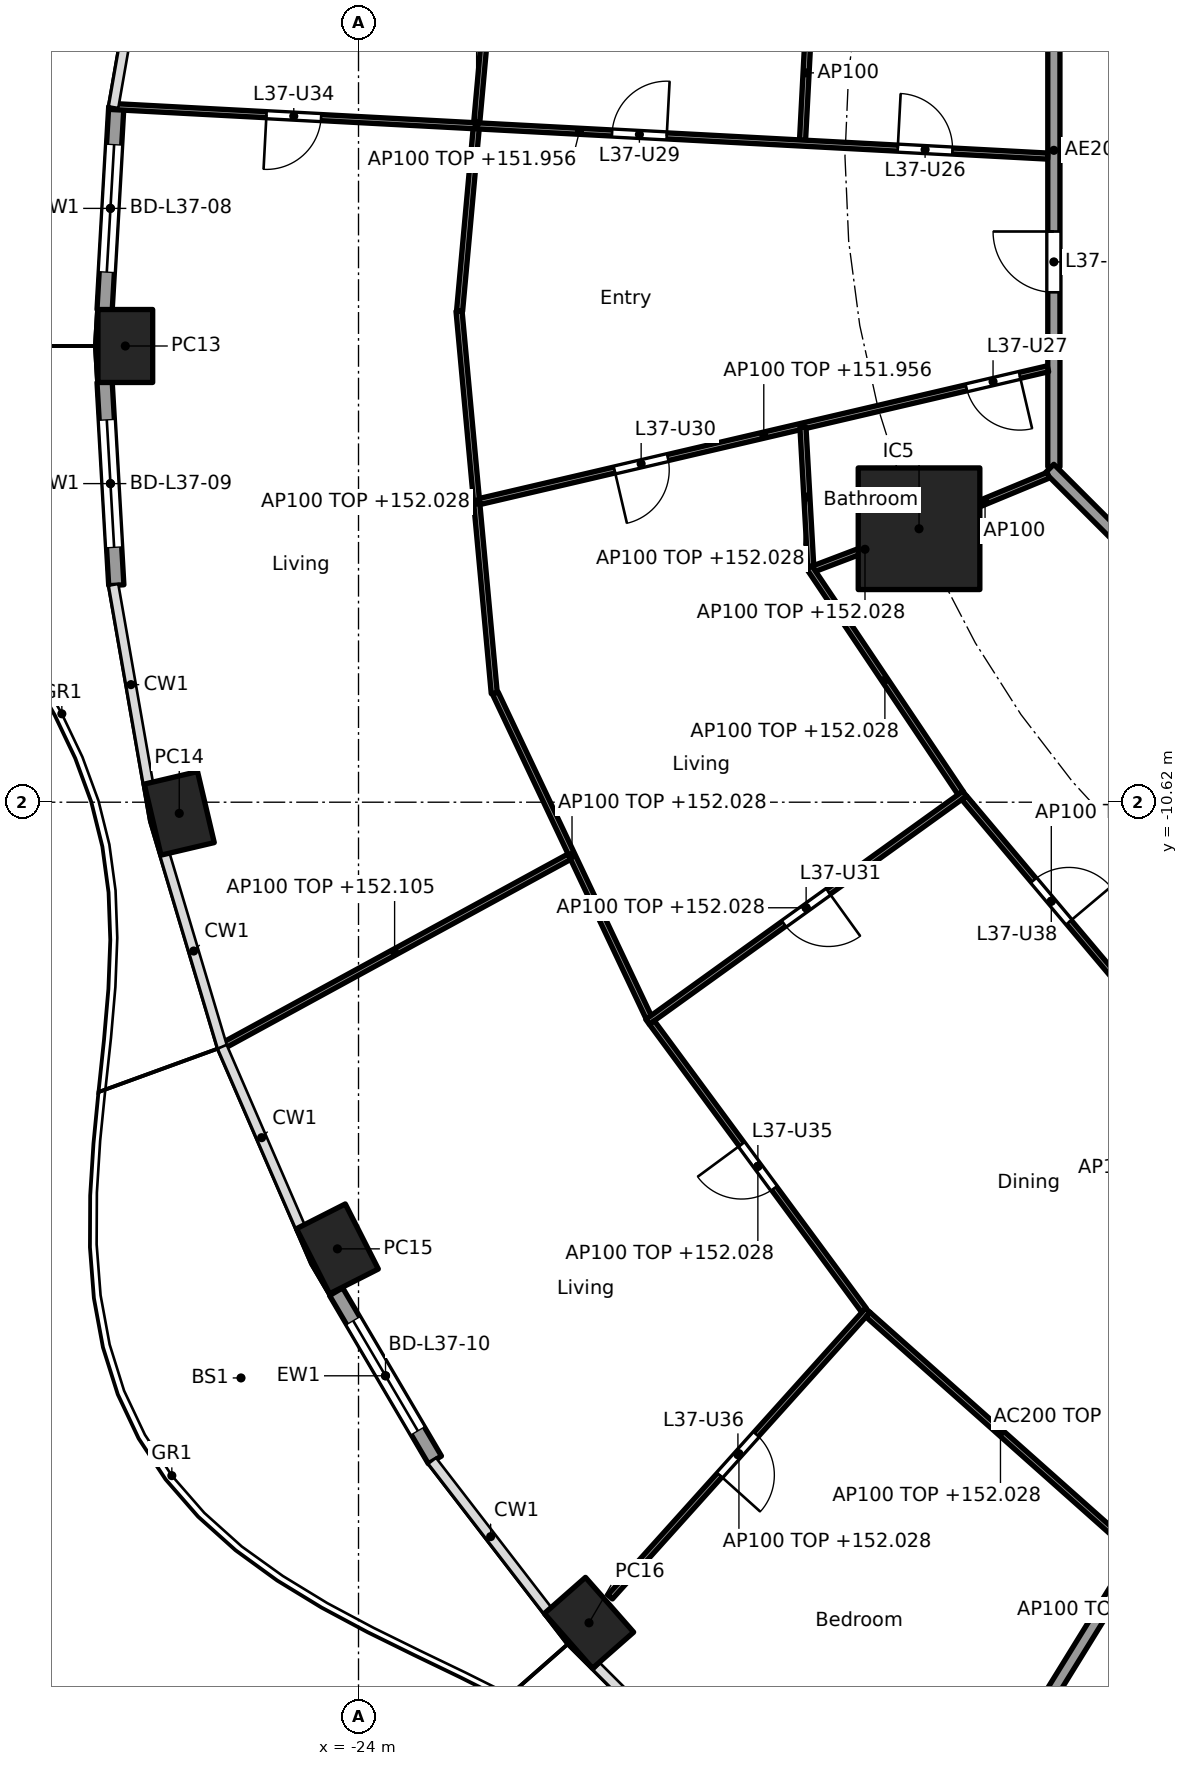
"""IFC4 building model, lengths in metres.
Left out: names, types, materials, properties, quantities, classifications, styles, units other than length and angle.
Written with IfcOpenShell. Run it as: python <this file> out.ifc"""

import sys

from ifc_helpers import new_model, si_unit, direction, frame, frame_2d, origin, origin_2d, place, context, subcontext, project, spatial, rectangle, hollow_rectangle, extrude, element, fill, save


model = new_model("IFC4")
c1 = context("Model", 3, precision=1e-05, world=origin(), true_north=direction((0.0, 1.0)))
c2 = subcontext(c1, "Body", "Model", "MODEL_VIEW")
j1 = project(units=[si_unit("LENGTHUNIT", "METRE"), si_unit("PLANEANGLEUNIT", "RADIAN")], contexts=[c1])
p1 = place(None, origin())
s1 = spatial("IfcSite", under=j1, at=p1, CompositionType="ELEMENT")
p2 = place(p1, origin())
s2 = spatial("IfcBuilding", under=s1, at=p2, CompositionType="ELEMENT")
p3 = place(p2, frame((0.0, 0.0, 149.2)))
s3 = spatial("IfcBuildingStorey", under=s2, at=p3, CompositionType="ELEMENT", Elevation=149.2)
for number, where, z_axis, x_axis in (
    (1, (-27.835, -3.118, 0.0), (0.0, 0.0, 1.0), (0.0, -1.0, 0.0)),
    (2, (-26.948, -10.803, 0.0), (0.0, 0.0, 1.0), (0.229, -0.973, 0.0)),
    (3, (-24.347, -17.965, 0.0), (0.0, 0.0, 1.0), (0.452, -0.892, 0.0)),
    (4, (-20.209, -24.115, 0.0), (0.0, 0.0, 1.0), (0.66, -0.751, 0.0)),
):
    element("IfcColumn", number, at=place(p3, frame(where, z_axis=z_axis, x_axis=x_axis)), inside=s3, PredefinedType="COLUMN", context=c2, shape_type="SweptSolid", body=[
        extrude(hollow_rectangle(XDim=1.2, YDim=0.9, WallThickness=0.04, at=origin_2d()), origin(), (0.0, 0.0, 1.0), 3.7),
    ])
p4 = place(p3, frame((-14.782, -6.123, 0.0), z_axis=(0.0, 0.0, 1.0), x_axis=(1.0, 0.0, 0.0)))
e5 = element("IfcColumn", 5, at=p4, inside=s3, PredefinedType="COLUMN", context=c2, shape_type="SweptSolid", body=[
    extrude(rectangle(XDim=2.0, YDim=2.0, at=origin_2d()), origin(), (0.0, 0.0, 1.0), 3.7),
])
p5 = place(p3, frame((-28.176, -2.526, 0.0), z_axis=(0.0, 0.0, 1.0), x_axis=(0.057537829427, 0.998343326809, 0.0)))
e6 = element("IfcWall", 6, at=p5, inside=s3, PredefinedType="SOLIDWALL", context=c2, shape_type="SweptSolid", body=[
    extrude(rectangle(XDim=3.348, YDim=0.25, at=frame_2d((1.674, 0.0))), origin(), (0.0, 0.0, 1.0), 3.44),
])
p6 = place(p5, frame((0.624, 0.0, 0.0)))
e7 = element("IfcOpeningElement", 7, at=p6, cuts=e6, PredefinedType="OPENING", context=c2, shape_type="SweptSolid", body=[
    extrude(rectangle(XDim=2.1, YDim=2.4, at=frame_2d((1.05, 1.2))), frame((0.0, 0.135, 0.0), z_axis=(0.0, -1.0, 0.0), x_axis=(1.0, 0.0, 0.0)), (0.0, 0.0, 1.0), 0.27),
])
p7 = place(p3, frame((-27.983, -7.052, 0.0), z_axis=(0.0, 0.0, 1.0), x_axis=(-0.057537829427, 0.998343326809, 0.0)))
e8 = element("IfcWall", 8, at=p7, inside=s3, PredefinedType="SOLIDWALL", context=c2, shape_type="SweptSolid", body=[
    extrude(rectangle(XDim=3.348, YDim=0.25, at=frame_2d((1.674, 0.0))), origin(), (0.0, 0.0, 1.0), 3.44),
])
p8 = place(p7, frame((0.624, 0.0, 0.0)))
e9 = element("IfcOpeningElement", 9, at=p8, cuts=e8, PredefinedType="OPENING", context=c2, shape_type="SweptSolid", body=[
    extrude(rectangle(XDim=2.1, YDim=2.4, at=frame_2d((1.05, 1.2))), frame((0.0, 0.135, 0.0), z_axis=(0.0, -1.0, 0.0), x_axis=(1.0, 0.0, 0.0)), (0.0, 0.0, 1.0), 0.27),
])
p9 = place(p3, frame((-22.744, -21.436, 0.0), z_axis=(0.0, 0.0, 1.0), x_axis=(-0.506314982873, 0.862348617508, 0.0)))
e10 = element("IfcWall", 10, at=p9, inside=s3, PredefinedType="SOLIDWALL", context=c2, shape_type="SweptSolid", body=[
    extrude(rectangle(XDim=3.208, YDim=0.25, at=frame_2d((1.604, 0.0))), origin(), (0.0, 0.0, 1.0), 3.44),
])
p10 = place(p9, frame((0.554, 0.0, 0.0)))
e11 = element("IfcOpeningElement", 11, at=p10, cuts=e10, PredefinedType="OPENING", context=c2, shape_type="SweptSolid", body=[
    extrude(rectangle(XDim=2.1, YDim=2.4, at=frame_2d((1.05, 1.2))), frame((0.0, 0.135, 0.0), z_axis=(0.0, -1.0, 0.0), x_axis=(1.0, 0.0, 0.0)), (0.0, 0.0, 1.0), 0.27),
])
p11 = place(p3, frame((-6.149, -14.825, 0.0), z_axis=(0.0, 0.0, 1.0), x_axis=(-0.525406383516, -0.85085141603, 0.0)))
e12 = element("IfcWall", 12, at=p11, inside=s3, PredefinedType="PARTITIONING", context=c2, shape_type="SweptSolid", body=[
    extrude(rectangle(XDim=15.925, YDim=0.2, at=frame_2d((7.962, 0.0))), origin(), (0.0, 0.0, 1.0), 2.828),
])
p12 = place(p3, frame((-12.565, 5.304, 0.0), z_axis=(0.0, 0.0, 1.0), x_axis=(0.0, -1.0, 0.0)))
e13 = element("IfcWall", 13, at=p12, inside=s3, PredefinedType="PARTITIONING", context=c2, shape_type="SweptSolid", body=[
    extrude(rectangle(XDim=10.409, YDim=0.2, at=frame_2d((5.205, 0.0))), origin(), (0.0, 0.0, 1.0), 3.44),
])
p13 = place(p12, frame((6.539, 0.0, 0.0)))
e14 = element("IfcOpeningElement", 14, at=p13, cuts=e13, PredefinedType="OPENING", context=c2, shape_type="SweptSolid", body=[
    extrude(rectangle(XDim=1.0, YDim=2.1, at=frame_2d((0.5, 1.05))), frame((0.0, 0.11, 0.0), z_axis=(0.0, -1.0, 0.0), x_axis=(1.0, 0.0, 0.0)), (0.0, 0.0, 1.0), 0.22),
])
p14 = place(p3, frame((-12.635, -5.134, 0.0), z_axis=(0.0, 0.0, 1.0), x_axis=(0.707106781187, -0.707106781187, 0.0)))
e15 = element("IfcWall", 15, at=p14, inside=s3, PredefinedType="PARTITIONING", context=c2, shape_type="SweptSolid", body=[
    extrude(rectangle(XDim=10.609, YDim=0.2, at=frame_2d((5.305, 0.0))), origin(), (0.0, 0.0, 1.0), 3.44),
])
p15 = place(p3, frame((-16.581, 2.485, 0.0), z_axis=(0.0, 0.0, 1.0), x_axis=(-0.052455156936, -0.998623280577, 0.0)))
e16 = element("IfcWall", 16, at=p15, inside=s3, PredefinedType="PARTITIONING", context=c2, shape_type="SweptSolid", body=[
    extrude(rectangle(XDim=2.225, YDim=0.1, at=frame_2d((1.112, 0.0))), origin(), (0.0, 0.0, 1.0), 3.44),
])
p16 = place(p3, frame((-21.777, 3.621, 0.0), z_axis=(0.0, 0.0, 1.0), x_axis=(-0.090606877484, -0.995886737412, 0.0)))
e17 = element("IfcWall", 17, at=p16, inside=s3, PredefinedType="PARTITIONING", context=c2, shape_type="SweptSolid", body=[
    extrude(rectangle(XDim=6.189, YDim=0.1, at=frame_2d((3.095, 0.0))), origin(), (0.0, 0.0, 1.0), 2.828),
])
p17 = place(p3, frame((-12.665, 0.005, 0.0), z_axis=(0.0, 0.0, 1.0), x_axis=(-0.998599229025, 0.052911055468, 0.0)))
e18 = element("IfcWall", 18, at=p17, inside=s3, PredefinedType="PARTITIONING", context=c2, shape_type="SweptSolid", body=[
    extrude(rectangle(XDim=15.425, YDim=0.1, at=frame_2d((7.713, 0.0))), origin(), (0.0, 0.0, 1.0), 2.756),
])
p18 = place(p17, frame((1.571, 0.0, 0.0)))
e19 = element("IfcOpeningElement", 19, at=p18, cuts=e18, PredefinedType="OPENING", context=c2, shape_type="SweptSolid", body=[
    extrude(rectangle(XDim=0.9, YDim=2.1, at=frame_2d((0.45, 1.05))), frame((0.0, 0.06, 0.0), z_axis=(0.0, -1.0, 0.0), x_axis=(1.0, 0.0, 0.0)), (0.0, 0.0, 1.0), 0.12),
])
p19 = place(p17, frame((6.276, 0.0, 0.0)))
e20 = element("IfcOpeningElement", 20, at=p19, cuts=e18, PredefinedType="OPENING", context=c2, shape_type="SweptSolid", body=[
    extrude(rectangle(XDim=0.9, YDim=2.1, at=frame_2d((0.45, 1.05))), frame((0.0, 0.06, 0.0), z_axis=(0.0, -1.0, 0.0), x_axis=(1.0, 0.0, 0.0)), (0.0, 0.0, 1.0), 0.12),
])
p20 = place(p17, frame((11.967, 0.0, 0.0)))
e21 = element("IfcOpeningElement", 21, at=p20, cuts=e18, PredefinedType="OPENING", context=c2, shape_type="SweptSolid", body=[
    extrude(rectangle(XDim=0.9, YDim=2.1, at=frame_2d((0.45, 1.05))), frame((0.0, 0.06, 0.0), z_axis=(0.0, -1.0, 0.0), x_axis=(1.0, 0.0, 0.0)), (0.0, 0.0, 1.0), 0.12),
])
p21 = place(p3, frame((-22.347, -2.542, 0.0), z_axis=(0.0, 0.0, 1.0), x_axis=(0.091783634244, -0.995778973711, 0.0)))
e22 = element("IfcWall", 22, at=p21, inside=s3, PredefinedType="PARTITIONING", context=c2, shape_type="SweptSolid", body=[
    extrude(rectangle(XDim=6.315, YDim=0.1, at=frame_2d((3.157, 0.0))), origin(), (0.0, 0.0, 1.0), 2.828),
])
p22 = place(p3, frame((-12.662, -3.492, 0.0), z_axis=(0.0, 0.0, 1.0), x_axis=(-0.973798787998, -0.227411346448, 0.0)))
e23 = element("IfcWall", 23, at=p22, inside=s3, PredefinedType="PARTITIONING", context=c2, shape_type="SweptSolid", body=[
    extrude(rectangle(XDim=9.598, YDim=0.1, at=frame_2d((4.799, 0.0))), origin(), (0.0, 0.0, 1.0), 2.756),
])
p23 = place(p22, frame((0.477, 0.0, 0.0)))
e24 = element("IfcOpeningElement", 24, at=p23, cuts=e23, PredefinedType="OPENING", context=c2, shape_type="SweptSolid", body=[
    extrude(rectangle(XDim=0.9, YDim=2.1, at=frame_2d((0.45, 1.05))), frame((0.0, 0.06, 0.0), z_axis=(0.0, -1.0, 0.0), x_axis=(1.0, 0.0, 0.0)), (0.0, 0.0, 1.0), 0.12),
])
p24 = place(p22, frame((6.42, 0.0, 0.0)))
e25 = element("IfcOpeningElement", 25, at=p24, cuts=e23, PredefinedType="OPENING", context=c2, shape_type="SweptSolid", body=[
    extrude(rectangle(XDim=0.9, YDim=2.1, at=frame_2d((0.45, 1.05))), frame((0.0, 0.06, 0.0), z_axis=(0.0, -1.0, 0.0), x_axis=(1.0, 0.0, 0.0)), (0.0, 0.0, 1.0), 0.12),
])
p25 = place(p3, frame((-16.691, -4.454, 0.0), z_axis=(0.0, 0.0, 1.0), x_axis=(0.05596405841, -0.998432784, 0.0)))
e26 = element("IfcWall", 26, at=p25, inside=s3, PredefinedType="PARTITIONING", context=c2, shape_type="SweptSolid", body=[
    extrude(rectangle(XDim=2.299, YDim=0.1, at=frame_2d((1.149, 0.0))), origin(), (0.0, 0.0, 1.0), 2.828),
])
p26 = place(p3, frame((-12.657, -5.243, 0.0), z_axis=(0.0, 0.0, 1.0), x_axis=(-0.923864733477, -0.382719158442, 0.0)))
e27 = element("IfcWall", 27, at=p26, inside=s3, PredefinedType="PARTITIONING", context=c2, shape_type="SweptSolid", body=[
    extrude(rectangle(XDim=2.25, YDim=0.1, at=frame_2d((1.125, 0.0))), origin(), (0.0, 0.0, 1.0), 3.44),
])
p27 = place(p3, frame((-14.829, -6.141, 0.0), z_axis=(0.0, 0.0, 1.0), x_axis=(-0.934704367514, -0.355426146128, 0.0)))
e28 = element("IfcWall", 28, at=p27, inside=s3, PredefinedType="PARTITIONING", context=c2, shape_type="SweptSolid", body=[
    extrude(rectangle(XDim=1.802, YDim=0.1, at=frame_2d((0.901, 0.0))), origin(), (0.0, 0.0, 1.0), 2.828),
])
p28 = place(p3, frame((-16.587, -6.757, 0.0), z_axis=(0.0, 0.0, 1.0), x_axis=(0.55699383956, -0.830516623971, 0.0)))
e29 = element("IfcWall", 29, at=p28, inside=s3, PredefinedType="PARTITIONING", context=c2, shape_type="SweptSolid", body=[
    extrude(rectangle(XDim=4.467, YDim=0.1, at=frame_2d((2.233, 0.0))), origin(), (0.0, 0.0, 1.0), 2.828),
])
p29 = place(p3, frame((-21.75, -8.826, 0.0), z_axis=(0.0, 0.0, 1.0), x_axis=(0.427739388908, -0.903902104863, 0.0)))
e30 = element("IfcWall", 30, at=p29, inside=s3, PredefinedType="PARTITIONING", context=c2, shape_type="SweptSolid", body=[
    extrude(rectangle(XDim=5.899, YDim=0.1, at=frame_2d((2.949, 0.0))), origin(), (0.0, 0.0, 1.0), 2.828),
])
p30 = place(p3, frame((-20.533, -11.516, 0.0), z_axis=(0.0, 0.0, 1.0), x_axis=(-0.877731656478, -0.479152521872, 0.0)))
e31 = element("IfcWall", 31, at=p30, inside=s3, PredefinedType="PARTITIONING", context=c2, shape_type="SweptSolid", body=[
    extrude(rectangle(XDim=6.548, YDim=0.1, at=frame_2d((3.274, 0.0))), origin(), (0.0, 0.0, 1.0), 2.905),
])
p31 = place(p3, frame((-14.031, -10.479, 0.0), z_axis=(0.0, 0.0, 1.0), x_axis=(-0.811653955345, -0.584138559567, 0.0)))
e32 = element("IfcWall", 32, at=p31, inside=s3, PredefinedType="PARTITIONING", context=c2, shape_type="SweptSolid", body=[
    extrude(rectangle(XDim=6.426, YDim=0.1, at=frame_2d((3.213, 0.0))), origin(), (0.0, 0.0, 1.0), 2.828),
])
p32 = place(p31, frame((2.763, 0.0, 0.0)))
e33 = element("IfcOpeningElement", 33, at=p32, cuts=e32, PredefinedType="OPENING", context=c2, shape_type="SweptSolid", body=[
    extrude(rectangle(XDim=0.9, YDim=2.1, at=frame_2d((0.45, 1.05))), frame((0.0, 0.06, 0.0), z_axis=(0.0, -1.0, 0.0), x_axis=(1.0, 0.0, 0.0)), (0.0, 0.0, 1.0), 0.12),
])
p33 = place(p3, frame((-14.04, -10.547, 0.0), z_axis=(0.0, 0.0, 1.0), x_axis=(0.644036028289, -0.764995159635, 0.0)))
e34 = element("IfcWall", 34, at=p33, inside=s3, PredefinedType="PARTITIONING", context=c2, shape_type="SweptSolid", body=[
    extrude(rectangle(XDim=4.448, YDim=0.1, at=frame_2d((2.224, 0.0))), origin(), (0.0, 0.0, 1.0), 2.828),
])
p34 = place(p33, frame((1.774, 0.0, 0.0)))
e35 = element("IfcOpeningElement", 35, at=p34, cuts=e34, PredefinedType="OPENING", context=c2, shape_type="SweptSolid", body=[
    extrude(rectangle(XDim=0.9, YDim=2.1, at=frame_2d((0.45, 1.05))), frame((0.0, 0.06, 0.0), z_axis=(0.0, -1.0, 0.0), x_axis=(1.0, 0.0, 0.0)), (0.0, 0.0, 1.0), 0.12),
])
p35 = place(p3, frame((-19.176, -14.244, 0.0), z_axis=(0.0, 0.0, 1.0), x_axis=(0.593532053206, -0.80481035146, 0.0)))
e36 = element("IfcWall", 36, at=p35, inside=s3, PredefinedType="PARTITIONING", context=c2, shape_type="SweptSolid", body=[
    extrude(rectangle(XDim=5.876, YDim=0.1, at=frame_2d((2.938, 0.0))), origin(), (0.0, 0.0, 1.0), 2.828),
])
p36 = place(p35, frame((2.488, 0.0, 0.0)))
e37 = element("IfcOpeningElement", 37, at=p36, cuts=e36, PredefinedType="OPENING", context=c2, shape_type="SweptSolid", body=[
    extrude(rectangle(XDim=0.9, YDim=2.1, at=frame_2d((0.45, 1.05))), frame((0.0, 0.06, 0.0), z_axis=(0.0, -1.0, 0.0), x_axis=(1.0, 0.0, 0.0)), (0.0, 0.0, 1.0), 0.12),
])
p37 = place(p3, frame((-15.626, -18.976, 0.0), z_axis=(0.0, 0.0, 1.0), x_axis=(-0.668485690917, -0.74372500364, 0.0)))
e38 = element("IfcWall", 38, at=p37, inside=s3, PredefinedType="PARTITIONING", context=c2, shape_type="SweptSolid", body=[
    extrude(rectangle(XDim=6.337, YDim=0.1, at=frame_2d((3.168, 0.0))), origin(), (0.0, 0.0, 1.0), 2.828),
])
p38 = place(p37, frame((2.744, 0.0, 0.0)))
e39 = element("IfcOpeningElement", 39, at=p38, cuts=e38, PredefinedType="OPENING", context=c2, shape_type="SweptSolid", body=[
    extrude(rectangle(XDim=0.9, YDim=2.1, at=frame_2d((0.45, 1.05))), frame((0.0, 0.06, 0.0), z_axis=(0.0, -1.0, 0.0), x_axis=(1.0, 0.0, 0.0)), (0.0, 0.0, 1.0), 0.12),
])
p39 = place(p3, frame((-15.622, -19.046, 0.0), z_axis=(0.0, 0.0, 1.0), x_axis=(0.747342322463, -0.664439201925, 0.0)))
e40 = element("IfcWall", 40, at=p39, inside=s3, PredefinedType="PARTITIONING", context=c2, shape_type="SweptSolid", body=[
    extrude(rectangle(XDim=5.831, YDim=0.1, at=frame_2d((2.916, 0.0))), origin(), (0.0, 0.0, 1.0), 2.828),
])
p40 = place(p6, origin())
e41 = element("IfcDoor", 41, at=p40, inside=s3, OperationType="SLIDING_TO_LEFT", PredefinedType="DOOR", context=c2, shape_type="SweptSolid", body=[
    extrude(rectangle(XDim=2.1, YDim=2.4, at=frame_2d((1.05, 1.2))), frame((0.0, 0.025, 0.0), z_axis=(0.0, -1.0, 0.0), x_axis=(1.0, 0.0, 0.0)), (0.0, 0.0, 1.0), 0.05),
])
fill(e7, e41)
p41 = place(p8, origin())
e42 = element("IfcDoor", 42, at=p41, inside=s3, OperationType="SLIDING_TO_LEFT", PredefinedType="DOOR", context=c2, shape_type="SweptSolid", body=[
    extrude(rectangle(XDim=2.1, YDim=2.4, at=frame_2d((1.05, 1.2))), frame((0.0, 0.025, 0.0), z_axis=(0.0, -1.0, 0.0), x_axis=(1.0, 0.0, 0.0)), (0.0, 0.0, 1.0), 0.05),
])
fill(e9, e42)
p42 = place(p10, origin())
e43 = element("IfcDoor", 43, at=p42, inside=s3, OperationType="SLIDING_TO_LEFT", PredefinedType="DOOR", context=c2, shape_type="SweptSolid", body=[
    extrude(rectangle(XDim=2.1, YDim=2.4, at=frame_2d((1.05, 1.2))), frame((0.0, 0.025, 0.0), z_axis=(0.0, -1.0, 0.0), x_axis=(1.0, 0.0, 0.0)), (0.0, 0.0, 1.0), 0.05),
])
fill(e11, e43)
p43 = place(p13, frame((1.0, 0.0, 0.0), x_axis=(-1.0, 0.0, 0.0)))
e44 = element("IfcDoor", 44, at=p43, inside=s3, OperationType="SINGLE_SWING_RIGHT", PredefinedType="DOOR", context=c2, shape_type="SweptSolid", body=[
    extrude(rectangle(XDim=1.0, YDim=2.1, at=frame_2d((0.5, 1.05))), frame((0.0, 0.025, 0.0), z_axis=(0.0, -1.0, 0.0), x_axis=(1.0, 0.0, 0.0)), (0.0, 0.0, 1.0), 0.05),
])
fill(e14, e44)
p44 = place(p18, frame((0.9, 0.0, 0.0), x_axis=(-1.0, 0.0, 0.0)))
e45 = element("IfcDoor", 45, at=p44, inside=s3, OperationType="SINGLE_SWING_LEFT", PredefinedType="DOOR", context=c2, shape_type="SweptSolid", body=[
    extrude(rectangle(XDim=0.9, YDim=2.1, at=frame_2d((0.45, 1.05))), frame((0.0, 0.025, 0.0), z_axis=(0.0, -1.0, 0.0), x_axis=(1.0, 0.0, 0.0)), (0.0, 0.0, 1.0), 0.05),
])
fill(e19, e45)
p45 = place(p23, origin())
e46 = element("IfcDoor", 46, at=p45, inside=s3, OperationType="SINGLE_SWING_LEFT", PredefinedType="DOOR", context=c2, shape_type="SweptSolid", body=[
    extrude(rectangle(XDim=0.9, YDim=2.1, at=frame_2d((0.45, 1.05))), frame((0.0, 0.025, 0.0), z_axis=(0.0, -1.0, 0.0), x_axis=(1.0, 0.0, 0.0)), (0.0, 0.0, 1.0), 0.05),
])
fill(e24, e46)
p46 = place(p19, frame((0.9, 0.0, 0.0), x_axis=(-1.0, 0.0, 0.0)))
e47 = element("IfcDoor", 47, at=p46, inside=s3, OperationType="SINGLE_SWING_RIGHT", PredefinedType="DOOR", context=c2, shape_type="SweptSolid", body=[
    extrude(rectangle(XDim=0.9, YDim=2.1, at=frame_2d((0.45, 1.05))), frame((0.0, 0.025, 0.0), z_axis=(0.0, -1.0, 0.0), x_axis=(1.0, 0.0, 0.0)), (0.0, 0.0, 1.0), 0.05),
])
fill(e20, e47)
p47 = place(p24, origin())
e48 = element("IfcDoor", 48, at=p47, inside=s3, OperationType="SINGLE_SWING_RIGHT", PredefinedType="DOOR", context=c2, shape_type="SweptSolid", body=[
    extrude(rectangle(XDim=0.9, YDim=2.1, at=frame_2d((0.45, 1.05))), frame((0.0, 0.025, 0.0), z_axis=(0.0, -1.0, 0.0), x_axis=(1.0, 0.0, 0.0)), (0.0, 0.0, 1.0), 0.05),
])
fill(e25, e48)
p48 = place(p32, origin())
e49 = element("IfcDoor", 49, at=p48, inside=s3, OperationType="SINGLE_SWING_LEFT", PredefinedType="DOOR", context=c2, shape_type="SweptSolid", body=[
    extrude(rectangle(XDim=0.9, YDim=2.1, at=frame_2d((0.45, 1.05))), frame((0.0, 0.025, 0.0), z_axis=(0.0, -1.0, 0.0), x_axis=(1.0, 0.0, 0.0)), (0.0, 0.0, 1.0), 0.05),
])
fill(e33, e49)
p49 = place(p20, origin())
e50 = element("IfcDoor", 50, at=p49, inside=s3, OperationType="SINGLE_SWING_RIGHT", PredefinedType="DOOR", context=c2, shape_type="SweptSolid", body=[
    extrude(rectangle(XDim=0.9, YDim=2.1, at=frame_2d((0.45, 1.05))), frame((0.0, 0.025, 0.0), z_axis=(0.0, -1.0, 0.0), x_axis=(1.0, 0.0, 0.0)), (0.0, 0.0, 1.0), 0.05),
])
fill(e21, e50)
p50 = place(p36, frame((0.9, 0.0, 0.0), x_axis=(-1.0, 0.0, 0.0)))
e51 = element("IfcDoor", 51, at=p50, inside=s3, OperationType="SINGLE_SWING_RIGHT", PredefinedType="DOOR", context=c2, shape_type="SweptSolid", body=[
    extrude(rectangle(XDim=0.9, YDim=2.1, at=frame_2d((0.45, 1.05))), frame((0.0, 0.025, 0.0), z_axis=(0.0, -1.0, 0.0), x_axis=(1.0, 0.0, 0.0)), (0.0, 0.0, 1.0), 0.05),
])
fill(e37, e51)
p51 = place(p38, origin())
e52 = element("IfcDoor", 52, at=p51, inside=s3, OperationType="SINGLE_SWING_RIGHT", PredefinedType="DOOR", context=c2, shape_type="SweptSolid", body=[
    extrude(rectangle(XDim=0.9, YDim=2.1, at=frame_2d((0.45, 1.05))), frame((0.0, 0.025, 0.0), z_axis=(0.0, -1.0, 0.0), x_axis=(1.0, 0.0, 0.0)), (0.0, 0.0, 1.0), 0.05),
])
fill(e39, e52)
p52 = place(p34, origin())
e53 = element("IfcDoor", 53, at=p52, inside=s3, OperationType="SINGLE_SWING_RIGHT", PredefinedType="DOOR", context=c2, shape_type="SweptSolid", body=[
    extrude(rectangle(XDim=0.9, YDim=2.1, at=frame_2d((0.45, 1.05))), frame((0.0, 0.025, 0.0), z_axis=(0.0, -1.0, 0.0), x_axis=(1.0, 0.0, 0.0)), (0.0, 0.0, 1.0), 0.05),
])
fill(e35, e53)
save(model, sys.argv[1])
